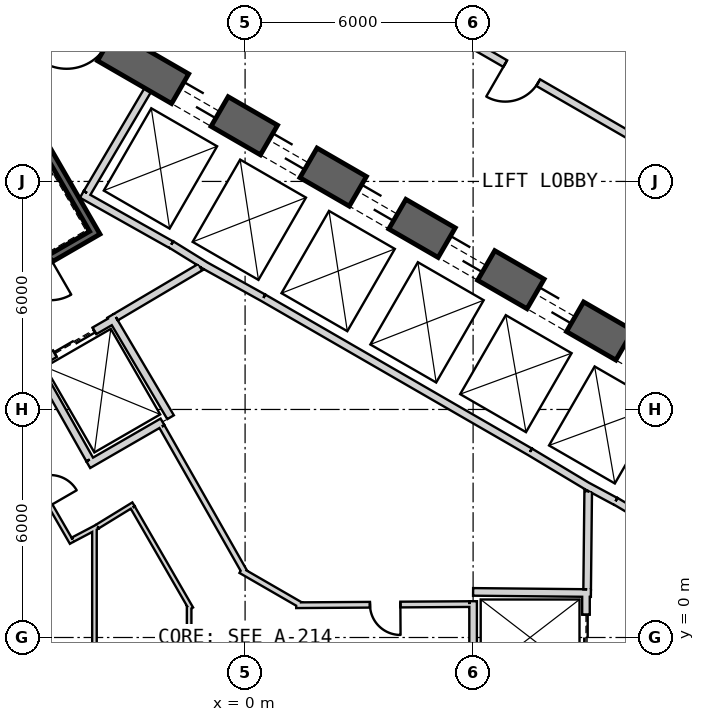
"""IFC4 building model, lengths in metres.
Left out: names, types, materials, properties, quantities, classifications, styles, units other than length and angle.
Written with IfcOpenShell. Run it as: python <this file> out.ifc"""

import sys

from ifc_helpers import new_model, si_unit, direction, frame, frame_2d, origin, place, context, subcontext, project, spatial, rectangle, extrude, element, fill, save


model = new_model("IFC4")
c1 = context("Model", 3, precision=1e-05, world=origin(), true_north=direction((0.0, 1.0)))
c2 = subcontext(c1, "Body", "Model", "MODEL_VIEW")
j1 = project(units=[si_unit("LENGTHUNIT", "METRE"), si_unit("PLANEANGLEUNIT", "RADIAN")], contexts=[c1])
p1 = place(None, origin())
s1 = spatial("IfcSite", under=j1, at=p1, CompositionType="ELEMENT")
p2 = place(p1, origin())
s2 = spatial("IfcBuilding", under=s1, at=p2, CompositionType="ELEMENT")
p3 = place(p2, frame((0.0, 0.0, 94.7)))
s3 = spatial("IfcBuildingStorey", under=s2, at=p3, CompositionType="ELEMENT", Elevation=94.7)
p4 = place(p3, frame((19.475, 2.208, 0.0), z_axis=(0.0, 0.0, 1.0), x_axis=(-0.866028369851, 0.499994862586, 0.0)))
e1 = element("IfcWall", 1, at=p4, inside=s3, PredefinedType="SHEAR", context=c2, shape_type="SweptSolid", body=[
    extrude(rectangle(XDim=31.523, YDim=0.9, at=frame_2d((15.762, 0.0))), origin(), (0.0, 0.0, 1.0), 4.1),
])
p5 = place(p4, frame((7.062, 0.0, 0.0)))
e2 = element("IfcOpeningElement", 2, at=p5, cuts=e1, PredefinedType="OPENING", context=c2, shape_type="SweptSolid", body=[
    extrude(rectangle(XDim=1.2, YDim=2.4, at=frame_2d((0.6, 1.2))), frame((0.0, 0.46, 0.0), z_axis=(0.0, -1.0, 0.0), x_axis=(1.0, 0.0, 0.0)), (0.0, 0.0, 1.0), 0.92),
])
p6 = place(p4, frame((9.762, 0.0, 0.0)))
e3 = element("IfcOpeningElement", 3, at=p6, cuts=e1, PredefinedType="OPENING", context=c2, shape_type="SweptSolid", body=[
    extrude(rectangle(XDim=1.2, YDim=2.4, at=frame_2d((0.6, 1.2))), frame((0.0, 0.46, 0.0), z_axis=(0.0, -1.0, 0.0), x_axis=(1.0, 0.0, 0.0)), (0.0, 0.0, 1.0), 0.92),
])
p7 = place(p4, frame((12.462, 0.0, 0.0)))
e4 = element("IfcOpeningElement", 4, at=p7, cuts=e1, PredefinedType="OPENING", context=c2, shape_type="SweptSolid", body=[
    extrude(rectangle(XDim=1.2, YDim=2.4, at=frame_2d((0.6, 1.2))), frame((0.0, 0.46, 0.0), z_axis=(0.0, -1.0, 0.0), x_axis=(1.0, 0.0, 0.0)), (0.0, 0.0, 1.0), 0.92),
])
p8 = place(p4, frame((15.162, 0.0, 0.0)))
e5 = element("IfcOpeningElement", 5, at=p8, cuts=e1, PredefinedType="OPENING", context=c2, shape_type="SweptSolid", body=[
    extrude(rectangle(XDim=1.2, YDim=2.4, at=frame_2d((0.6, 1.2))), frame((0.0, 0.46, 0.0), z_axis=(0.0, -1.0, 0.0), x_axis=(1.0, 0.0, 0.0)), (0.0, 0.0, 1.0), 0.92),
])
p9 = place(p4, frame((17.862, 0.0, 0.0)))
e6 = element("IfcOpeningElement", 6, at=p9, cuts=e1, PredefinedType="OPENING", context=c2, shape_type="SweptSolid", body=[
    extrude(rectangle(XDim=1.2, YDim=2.4, at=frame_2d((0.6, 1.2))), frame((0.0, 0.46, 0.0), z_axis=(0.0, -1.0, 0.0), x_axis=(1.0, 0.0, 0.0)), (0.0, 0.0, 1.0), 0.92),
])
p10 = place(p4, frame((20.562, 0.0, 0.0)))
e7 = element("IfcOpeningElement", 7, at=p10, cuts=e1, PredefinedType="OPENING", context=c2, shape_type="SweptSolid", body=[
    extrude(rectangle(XDim=1.2, YDim=2.4, at=frame_2d((0.6, 1.2))), frame((0.0, 0.46, 0.0), z_axis=(0.0, -1.0, 0.0), x_axis=(1.0, 0.0, 0.0)), (0.0, 0.0, 1.0), 0.92),
])
p11 = place(p4, frame((23.262, 0.0, 0.0)))
e8 = element("IfcOpeningElement", 8, at=p11, cuts=e1, PredefinedType="OPENING", context=c2, shape_type="SweptSolid", body=[
    extrude(rectangle(XDim=1.2, YDim=2.4, at=frame_2d((0.6, 1.2))), frame((0.0, 0.46, 0.0), z_axis=(0.0, -1.0, 0.0), x_axis=(1.0, 0.0, 0.0)), (0.0, 0.0, 1.0), 0.92),
])
p12 = place(p4, frame((3.612, 0.0, 0.0)))
e9 = element("IfcOpeningElement", 9, at=p12, cuts=e1, PredefinedType="OPENING", context=c2, shape_type="SweptSolid", body=[
    extrude(rectangle(XDim=1.2, YDim=2.4, at=frame_2d((0.6, 1.2))), frame((0.0, 0.46, 0.0), z_axis=(0.0, -1.0, 0.0), x_axis=(1.0, 0.0, 0.0)), (0.0, 0.0, 1.0), 0.92),
])
p13 = place(p4, frame((26.712, 0.0, 0.0)))
e10 = element("IfcOpeningElement", 10, at=p13, cuts=e1, PredefinedType="OPENING", context=c2, shape_type="SweptSolid", body=[
    extrude(rectangle(XDim=1.2, YDim=2.4, at=frame_2d((0.6, 1.2))), frame((0.0, 0.46, 0.0), z_axis=(0.0, -1.0, 0.0), x_axis=(1.0, 0.0, 0.0)), (0.0, 0.0, 1.0), 0.92),
])
p14 = place(p3, frame((7.497, 4.886, 0.0), z_axis=(0.0, 0.0, 1.0), x_axis=(-0.866030989016, 0.499990325971, 0.0)))
e11 = element("IfcWall", 11, at=p14, inside=s3, PredefinedType="PLUMBINGWALL", context=c2, shape_type="SweptSolid", body=[
    extrude(rectangle(XDim=8.1, YDim=0.2, at=frame_2d((4.05, 0.0))), origin(), (0.0, 0.0, 1.0), 3.8),
])
p15 = place(p3, frame((12.073, 2.211, 0.0), z_axis=(0.0, 0.0, 1.0), x_axis=(-0.860438357912, 0.509554542943, 0.0)))
e12 = element("IfcWall", 12, at=p15, inside=s3, PredefinedType="PLUMBINGWALL", context=c2, shape_type="SweptSolid", body=[
    extrude(rectangle(XDim=2.7, YDim=0.2, at=frame_2d((1.35, 0.0))), origin(), (0.0, 0.0, 1.0), 3.8),
])
p16 = place(p3, frame((9.748, 3.583, 0.0), z_axis=(0.0, 0.0, 1.0), x_axis=(-0.880917147855, 0.473270513147, 0.0)))
e13 = element("IfcWall", 13, at=p16, inside=s3, PredefinedType="PLUMBINGWALL", context=c2, shape_type="SweptSolid", body=[
    extrude(rectangle(XDim=0.878, YDim=0.2, at=frame_2d((0.439, 0.0))), origin(), (0.0, 0.0, 1.0), 3.8),
])
p17 = place(p3, frame((9.079, 3.937, 0.0), z_axis=(0.0, 0.0, 1.0), x_axis=(-0.857516281273, 0.51445682749, 0.0)))
e14 = element("IfcWall", 14, at=p17, inside=s3, PredefinedType="PLUMBINGWALL", context=c2, shape_type="SweptSolid", body=[
    extrude(rectangle(XDim=1.845, YDim=0.2, at=frame_2d((0.922, 0.0))), origin(), (0.0, 0.0, 1.0), 3.8),
])
p18 = place(p3, frame((-1.941, 10.339, 0.0), z_axis=(0.0, 0.0, 1.0), x_axis=(0.850216889117, -0.526432561171, 0.0)))
e15 = element("IfcWall", 15, at=p18, inside=s3, PredefinedType="PLUMBINGWALL", context=c2, shape_type="SweptSolid", body=[
    extrude(rectangle(XDim=1.078, YDim=0.2, at=frame_2d((0.539, 0.0))), origin(), (0.0, 0.0, 1.0), 3.8),
])
p19 = place(p3, frame((0.483, 8.936, 0.0), z_axis=(0.0, 0.0, 1.0), x_axis=(-0.874269620932, 0.485440655401, 0.0)))
e16 = element("IfcWall", 16, at=p19, inside=s3, PredefinedType="PLUMBINGWALL", context=c2, shape_type="SweptSolid", body=[
    extrude(rectangle(XDim=1.845, YDim=0.2, at=frame_2d((0.922, 0.0))), origin(), (0.0, 0.0, 1.0), 3.8),
])
p20 = place(p3, frame((-4.296, 11.659, 0.0), z_axis=(0.0, 0.0, 1.0), x_axis=(0.871534483978, -0.490334215854, 0.0)))
e17 = element("IfcWall", 17, at=p20, inside=s3, PredefinedType="PLUMBINGWALL", context=c2, shape_type="SweptSolid", body=[
    extrude(rectangle(XDim=2.7, YDim=0.2, at=frame_2d((1.35, 0.0))), origin(), (0.0, 0.0, 1.0), 3.8),
])
p21 = place(p3, frame((-4.158, 11.696, 0.0), z_axis=(0.0, 0.0, 1.0), x_axis=(0.508018930956, 0.861345903683, 0.0)))
e18 = element("IfcWall", 18, at=p21, inside=s3, PredefinedType="PLUMBINGWALL", context=c2, shape_type="SweptSolid", body=[
    extrude(rectangle(XDim=3.15, YDim=0.2, at=frame_2d((1.575, 0.0))), origin(), (0.0, 0.0, 1.0), 3.8),
])
p22 = place(p3, frame((8.97, 1.2, 0.0), z_axis=(0.0, 0.0, 1.0), x_axis=(0.0, -1.0, 0.0)))
e19 = element("IfcWall", 19, at=p22, inside=s3, PredefinedType="PLUMBINGWALL", context=c2, shape_type="SweptSolid", body=[
    extrude(rectangle(XDim=2.4, YDim=0.2, at=frame_2d((1.2, 0.0))), origin(), (0.0, 0.0, 1.0), 3.8),
])
p23 = place(p22, frame((0.6, 0.0, 0.0)))
e20 = element("IfcOpeningElement", 20, at=p23, cuts=e19, PredefinedType="OPENING", context=c2, shape_type="SweptSolid", body=[
    extrude(rectangle(XDim=1.2, YDim=2.4, at=frame_2d((0.6, 1.2))), frame((0.0, 0.11, 0.0), z_axis=(0.0, -1.0, 0.0), x_axis=(1.0, 0.0, 0.0)), (0.0, 0.0, 1.0), 0.22),
])
p24 = place(p3, frame((6.0, 1.2, 0.0), z_axis=(0.0, 0.0, 1.0), x_axis=(0.999949988, -0.010001074852, 0.0)))
e21 = element("IfcWall", 21, at=p24, inside=s3, PredefinedType="PLUMBINGWALL", context=c2, shape_type="SweptSolid", body=[
    extrude(rectangle(XDim=3.1, YDim=0.2, at=frame_2d((1.55, 0.0))), origin(), (0.0, 0.0, 1.0), 3.8),
])
p25 = place(p3, frame((6.0, -1.1, 0.0), z_axis=(0.0, 0.0, 1.0), x_axis=(0.0, 1.0, 0.0)))
e22 = element("IfcWall", 22, at=p25, inside=s3, PredefinedType="PLUMBINGWALL", context=c2, shape_type="SweptSolid", body=[
    extrude(rectangle(XDim=2.055, YDim=0.2, at=frame_2d((1.027, 0.0))), origin(), (0.0, 0.0, 1.0), 3.8),
])
p26 = place(p3, frame((-7.854, 17.405, -0.3), z_axis=(0.0, 0.0, 1.0), x_axis=(0.499997992926, -0.866026562566, 0.0)))
e23 = element("IfcWall", 23, at=p26, inside=s3, PredefinedType="SHEAR", context=c2, shape_type="SweptSolid", body=[
    extrude(rectangle(XDim=7.9, YDim=0.2, at=frame_2d((3.95, 0.0))), origin(), (0.0, 0.0, 1.0), 4.1),
])
p27 = place(p3, frame((-7.159, 8.8, -0.3), z_axis=(0.0, 0.0, 1.0), x_axis=(0.866047807691, 0.499961193289, 0.0)))
e24 = element("IfcWall", 24, at=p27, inside=s3, PredefinedType="SHEAR", context=c2, shape_type="SweptSolid", body=[
    extrude(rectangle(XDim=3.6, YDim=0.2, at=frame_2d((1.8, 0.0))), origin(), (0.0, 0.0, 1.0), 4.1),
])
p28 = place(p27, frame((1.25, 0.0, 0.3)))
e25 = element("IfcOpeningElement", 25, at=p28, cuts=e24, PredefinedType="OPENING", context=c2, shape_type="SweptSolid", body=[
    extrude(rectangle(XDim=1.1, YDim=2.1, at=frame_2d((0.55, 1.05))), frame((0.0, 0.11, 0.0), z_axis=(0.0, -1.0, 0.0), x_axis=(1.0, 0.0, 0.0)), (0.0, 0.0, 1.0), 0.22),
])
p29 = place(p3, frame((-5.524, 7.168, 0.0), z_axis=(0.0, 0.0, 1.0), x_axis=(0.866024647952, 0.500001309137, 0.0)))
e26 = element("IfcWall", 26, at=p29, inside=s3, PredefinedType="PLUMBINGWALL", context=c2, shape_type="SweptSolid", body=[
    extrude(rectangle(XDim=2.4, YDim=0.2, at=frame_2d((1.2, 0.0))), origin(), (0.0, 0.0, 1.0), 3.8),
])
p30 = place(p29, frame((0.6, 0.0, 0.0)))
e27 = element("IfcOpeningElement", 27, at=p30, cuts=e26, PredefinedType="OPENING", context=c2, shape_type="SweptSolid", body=[
    extrude(rectangle(XDim=1.2, YDim=2.4, at=frame_2d((0.6, 1.2))), frame((0.0, 0.11, 0.0), z_axis=(0.0, -1.0, 0.0), x_axis=(1.0, 0.0, 0.0)), (0.0, 0.0, 1.0), 0.22),
])
p31 = place(p3, frame((-3.538, 8.465, 0.0), z_axis=(0.0, 0.0, 1.0), x_axis=(0.508647062354, -0.860975125052, 0.0)))
e28 = element("IfcWall", 28, at=p31, inside=s3, PredefinedType="PLUMBINGWALL", context=c2, shape_type="SweptSolid", body=[
    extrude(rectangle(XDim=3.1, YDim=0.2, at=frame_2d((1.55, 0.0))), origin(), (0.0, 0.0, 1.0), 3.8),
])
p32 = place(p3, frame((-2.173, 5.673, 0.0), z_axis=(0.0, 0.0, 1.0), x_axis=(-0.866028691075, -0.499994306202, 0.0)))
e29 = element("IfcWall", 29, at=p32, inside=s3, PredefinedType="PLUMBINGWALL", context=c2, shape_type="SweptSolid", body=[
    extrude(rectangle(XDim=2.254, YDim=0.2, at=frame_2d((1.127, 0.0))), origin(), (0.0, 0.0, 1.0), 3.8),
])
p33 = place(p3, frame((-5.562, 7.296, 0.0), z_axis=(0.0, 0.0, 1.0), x_axis=(0.49134651263, -0.870964180966, 0.0)))
e30 = element("IfcWall", 30, at=p33, inside=s3, PredefinedType="PLUMBINGWALL", context=c2, shape_type="SweptSolid", body=[
    extrude(rectangle(XDim=3.0, YDim=0.2, at=frame_2d((1.5, 0.0))), origin(), (0.0, 0.0, 1.0), 3.8),
])
p34 = place(p3, frame((9.001, 1.27, 0.0), z_axis=(0.0, 0.0, 1.0), x_axis=(0.010784614026, 0.999941844359, 0.0)))
e31 = element("IfcWall", 31, at=p34, inside=s3, PredefinedType="PARTITIONING", context=c2, shape_type="SweptSolid", body=[
    extrude(rectangle(XDim=2.581, YDim=0.2, at=frame_2d((1.291, 0.0))), origin(), (0.0, 0.0, 1.0), 3.8),
])
p35 = place(p3, frame((-1.18, 9.744, 0.0), z_axis=(0.0, 0.0, 1.0), x_axis=(-0.860615607571, -0.509255118781, 0.0)))
e32 = element("IfcWall", 32, at=p35, inside=s3, PredefinedType="PARTITIONING", context=c2, shape_type="SweptSolid", body=[
    extrude(rectangle(XDim=2.581, YDim=0.2, at=frame_2d((1.29, 0.0))), origin(), (0.0, 0.0, 1.0), 3.8),
])
p36 = place(p3, frame((1.344, 0.849, 0.0), z_axis=(0.0, 0.0, 1.0), x_axis=(0.999978627641, 0.00653790957, 0.0)))
e33 = element("IfcWall", 33, at=p36, inside=s3, PredefinedType="PLUMBINGWALL", context=c2, shape_type="SweptSolid", body=[
    extrude(rectangle(XDim=4.556, YDim=0.15, at=frame_2d((2.278, 0.0))), origin(), (0.0, 0.0, 1.0), 3.8),
])
p37 = place(p36, frame((1.942, 0.0, 0.0)))
e34 = element("IfcOpeningElement", 34, at=p37, cuts=e33, PredefinedType="OPENING", context=c2, shape_type="SweptSolid", body=[
    extrude(rectangle(XDim=0.8, YDim=2.1, at=frame_2d((0.4, 1.05))), frame((0.0, 0.085, 0.0), z_axis=(0.0, -1.0, 0.0), x_axis=(1.0, 0.0, 0.0)), (0.0, 0.0, 1.0), 0.17),
])
p38 = place(p3, frame((-0.111, 1.764, 0.0), z_axis=(0.0, 0.0, 1.0), x_axis=(0.866061671171, -0.499937177781, 0.0)))
e35 = element("IfcWall", 35, at=p38, inside=s3, PredefinedType="PLUMBINGWALL", context=c2, shape_type="SweptSolid", body=[
    extrude(rectangle(XDim=1.804, YDim=0.15, at=frame_2d((0.902, 0.0))), origin(), (0.0, 0.0, 1.0), 3.8),
])
p39 = place(p3, frame((-2.189, 5.549, 0.0), z_axis=(0.0, 0.0, 1.0), x_axis=(0.494335077001, -0.869271437266, 0.0)))
e36 = element("IfcWall", 36, at=p39, inside=s3, PredefinedType="PLUMBINGWALL", context=c2, shape_type="SweptSolid", body=[
    extrude(rectangle(XDim=4.404, YDim=0.15, at=frame_2d((2.202, 0.0))), origin(), (0.0, 0.0, 1.0), 3.8),
])
p40 = place(p3, frame((-3.964, -2.908, 0.0), z_axis=(0.0, 0.0, 1.0), x_axis=(0.0, 1.0, 0.0)))
e37 = element("IfcWall", 37, at=p40, inside=s3, PredefinedType="PARTITIONING", context=c2, shape_type="SweptSolid", body=[
    extrude(rectangle(XDim=5.815, YDim=0.12, at=frame_2d((2.908, 0.0))), origin(), (0.0, 0.0, 1.0), 3.8),
])
p41 = place(p3, frame((-4.558, 2.495, 0.0), z_axis=(0.0, 0.0, 1.0), x_axis=(-0.499990139034, 0.866031096941, 0.0)))
e38 = element("IfcWall", 38, at=p41, inside=s3, PredefinedType="PARTITIONING", context=c2, shape_type="SweptSolid", body=[
    extrude(rectangle(XDim=3.0, YDim=0.12, at=frame_2d((1.5, 0.0))), origin(), (0.0, 0.0, 1.0), 3.8),
])
p42 = place(p41, frame((1.13, 0.0, 0.0)))
e39 = element("IfcOpeningElement", 39, at=p42, cuts=e38, PredefinedType="OPENING", context=c2, shape_type="SweptSolid", body=[
    extrude(rectangle(XDim=0.8, YDim=2.1, at=frame_2d((0.4, 1.05))), frame((0.0, 0.07, 0.0), z_axis=(0.0, -1.0, 0.0), x_axis=(1.0, 0.0, 0.0)), (0.0, 0.0, 1.0), 0.14),
])
p43 = place(p3, frame((-3.881, 2.919, 0.0), z_axis=(0.0, 0.0, 1.0), x_axis=(-0.885333337811, -0.464956859246, 0.0)))
e40 = element("IfcWall", 40, at=p43, inside=s3, PredefinedType="PARTITIONING", context=c2, shape_type="SweptSolid", body=[
    extrude(rectangle(XDim=0.739, YDim=0.12, at=frame_2d((0.37, 0.0))), origin(), (0.0, 0.0, 1.0), 3.8),
])
p44 = place(p3, frame((-2.935, 3.503, 0.0), z_axis=(0.0, 0.0, 1.0), x_axis=(-0.852471794044, -0.522773220774, 0.0)))
e41 = element("IfcWall", 41, at=p44, inside=s3, PredefinedType="PARTITIONING", context=c2, shape_type="SweptSolid", body=[
    extrude(rectangle(XDim=1.112, YDim=0.12, at=frame_2d((0.556, 0.0))), origin(), (0.0, 0.0, 1.0), 3.8),
])
p45 = place(p3, frame((-1.42, 0.76, 0.0), z_axis=(0.0, 0.0, 1.0), x_axis=(-0.500011413361, 0.866018814177, 0.0)))
e42 = element("IfcWall", 42, at=p45, inside=s3, PredefinedType="PARTITIONING", context=c2, shape_type="SweptSolid", body=[
    extrude(rectangle(XDim=3.072, YDim=0.12, at=frame_2d((1.536, 0.0))), origin(), (0.0, 0.0, 1.0), 3.8),
])
p46 = place(p3, frame((-1.472, -0.954, 0.0), z_axis=(0.0, 0.0, 1.0), x_axis=(0.0, 1.0, 0.0)))
e43 = element("IfcWall", 43, at=p46, inside=s3, PredefinedType="PARTITIONING", context=c2, shape_type="SweptSolid", body=[
    extrude(rectangle(XDim=1.785, YDim=0.12, at=frame_2d((0.893, 0.0))), origin(), (0.0, 0.0, 1.0), 3.8),
])
p47 = place(p3, frame((13.031, 11.529, 0.0), z_axis=(0.0, 0.0, 1.0), x_axis=(-0.866023969537, 0.500002484181, 0.0)))
e44 = element("IfcWall", 44, at=p47, inside=s3, PredefinedType="PARTITIONING", context=c2, shape_type="SweptSolid", body=[
    extrude(rectangle(XDim=13.308, YDim=0.2, at=frame_2d((6.654, 0.0))), origin(), (0.0, 0.0, 1.0), 3.08),
])
p48 = place(p47, frame((6.142, 0.0, 0.0)))
e45 = element("IfcOpeningElement", 45, at=p48, cuts=e44, PredefinedType="OPENING", context=c2, shape_type="SweptSolid", body=[
    extrude(rectangle(XDim=1.0, YDim=2.1, at=frame_2d((0.5, 1.05))), frame((0.0, 0.11, 0.0), z_axis=(0.0, -1.0, 0.0), x_axis=(1.0, 0.0, 0.0)), (0.0, 0.0, 1.0), 0.22),
])
p49 = place(p23, origin())
e46 = element("IfcDoor", 46, at=p49, inside=s3, OperationType="SLIDING_TO_LEFT", PredefinedType="USERDEFINED", context=c2, shape_type="SweptSolid", body=[
    extrude(rectangle(XDim=1.2, YDim=2.4, at=frame_2d((0.6, 1.2))), frame((0.0, 0.025, 0.0), z_axis=(0.0, -1.0, 0.0), x_axis=(1.0, 0.0, 0.0)), (0.0, 0.0, 1.0), 0.05),
])
fill(e20, e46)
p50 = place(p30, origin())
e47 = element("IfcDoor", 47, at=p50, inside=s3, OperationType="SLIDING_TO_LEFT", PredefinedType="USERDEFINED", context=c2, shape_type="SweptSolid", body=[
    extrude(rectangle(XDim=1.2, YDim=2.4, at=frame_2d((0.6, 1.2))), frame((0.0, 0.025, 0.0), z_axis=(0.0, -1.0, 0.0), x_axis=(1.0, 0.0, 0.0)), (0.0, 0.0, 1.0), 0.05),
])
fill(e27, e47)
p51 = place(p37, origin())
e48 = element("IfcDoor", 48, at=p51, inside=s3, OperationType="SINGLE_SWING_LEFT", PredefinedType="USERDEFINED", context=c2, shape_type="SweptSolid", body=[
    extrude(rectangle(XDim=0.8, YDim=2.1, at=frame_2d((0.4, 1.05))), frame((0.0, 0.025, 0.0), z_axis=(0.0, -1.0, 0.0), x_axis=(1.0, 0.0, 0.0)), (0.0, 0.0, 1.0), 0.05),
])
fill(e34, e48)
p52 = place(p48, origin())
e49 = element("IfcDoor", 49, at=p52, inside=s3, OperationType="SINGLE_SWING_LEFT", PredefinedType="USERDEFINED", context=c2, shape_type="SweptSolid", body=[
    extrude(rectangle(XDim=1.0, YDim=2.1, at=frame_2d((0.5, 1.05))), frame((0.0, 0.025, 0.0), z_axis=(0.0, -1.0, 0.0), x_axis=(1.0, 0.0, 0.0)), (0.0, 0.0, 1.0), 0.05),
])
fill(e45, e49)
p53 = place(p6, origin())
e50 = element("IfcDoor", 50, at=p53, inside=s3, OperationType="SLIDING_TO_LEFT", PredefinedType="USERDEFINED", context=c2, shape_type="SweptSolid", body=[
    extrude(rectangle(XDim=1.2, YDim=2.4, at=frame_2d((0.6, 1.2))), frame((0.0, 0.025, 0.0), z_axis=(0.0, -1.0, 0.0), x_axis=(1.0, 0.0, 0.0)), (0.0, 0.0, 1.0), 0.05),
])
fill(e3, e50)
p54 = place(p7, origin())
e51 = element("IfcDoor", 51, at=p54, inside=s3, OperationType="SLIDING_TO_LEFT", PredefinedType="USERDEFINED", context=c2, shape_type="SweptSolid", body=[
    extrude(rectangle(XDim=1.2, YDim=2.4, at=frame_2d((0.6, 1.2))), frame((0.0, 0.025, 0.0), z_axis=(0.0, -1.0, 0.0), x_axis=(1.0, 0.0, 0.0)), (0.0, 0.0, 1.0), 0.05),
])
fill(e4, e51)
p55 = place(p8, origin())
e52 = element("IfcDoor", 52, at=p55, inside=s3, OperationType="SLIDING_TO_LEFT", PredefinedType="USERDEFINED", context=c2, shape_type="SweptSolid", body=[
    extrude(rectangle(XDim=1.2, YDim=2.4, at=frame_2d((0.6, 1.2))), frame((0.0, 0.025, 0.0), z_axis=(0.0, -1.0, 0.0), x_axis=(1.0, 0.0, 0.0)), (0.0, 0.0, 1.0), 0.05),
])
fill(e5, e52)
p56 = place(p9, origin())
e53 = element("IfcDoor", 53, at=p56, inside=s3, OperationType="SLIDING_TO_LEFT", PredefinedType="USERDEFINED", context=c2, shape_type="SweptSolid", body=[
    extrude(rectangle(XDim=1.2, YDim=2.4, at=frame_2d((0.6, 1.2))), frame((0.0, 0.025, 0.0), z_axis=(0.0, -1.0, 0.0), x_axis=(1.0, 0.0, 0.0)), (0.0, 0.0, 1.0), 0.05),
])
fill(e6, e53)
p57 = place(p10, origin())
e54 = element("IfcDoor", 54, at=p57, inside=s3, OperationType="SLIDING_TO_LEFT", PredefinedType="USERDEFINED", context=c2, shape_type="SweptSolid", body=[
    extrude(rectangle(XDim=1.2, YDim=2.4, at=frame_2d((0.6, 1.2))), frame((0.0, 0.025, 0.0), z_axis=(0.0, -1.0, 0.0), x_axis=(1.0, 0.0, 0.0)), (0.0, 0.0, 1.0), 0.05),
])
fill(e7, e54)
p58 = place(p11, origin())
e55 = element("IfcDoor", 55, at=p58, inside=s3, OperationType="SLIDING_TO_LEFT", PredefinedType="USERDEFINED", context=c2, shape_type="SweptSolid", body=[
    extrude(rectangle(XDim=1.2, YDim=2.4, at=frame_2d((0.6, 1.2))), frame((0.0, 0.025, 0.0), z_axis=(0.0, -1.0, 0.0), x_axis=(1.0, 0.0, 0.0)), (0.0, 0.0, 1.0), 0.05),
])
fill(e8, e55)
save(model, sys.argv[1])
